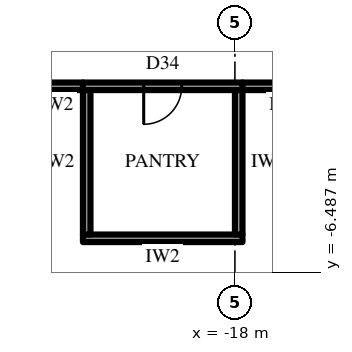
"""IFC4 building model, lengths in metres.
Left out: names, types, materials, properties, quantities, classifications, styles, units other than length and angle.
Written with IfcOpenShell. Run it as: python <this file> out.ifc"""

import sys

from ifc_helpers import new_model, si_unit, direction, frame, frame_2d, origin, place, context, subcontext, project, spatial, rectangle, extrude, element, fill, save


model = new_model("IFC4")
c1 = context("Model", 3, precision=1e-05, world=origin(), true_north=direction((0.0, 1.0)))
c2 = subcontext(c1, "Body", "Model", "MODEL_VIEW")
j1 = project(units=[si_unit("LENGTHUNIT", "METRE"), si_unit("PLANEANGLEUNIT", "RADIAN")], contexts=[c1])
p1 = place(None, origin())
s1 = spatial("IfcSite", under=j1, at=p1, CompositionType="ELEMENT")
p2 = place(p1, origin())
s2 = spatial("IfcBuilding", under=s1, at=p2, CompositionType="ELEMENT")
p3 = place(p2, frame((0.0, 0.0, 240.7)))
s3 = spatial("IfcBuildingStorey", under=s2, at=p3, CompositionType="ELEMENT", Elevation=240.7)
p4 = place(p3, frame((-31.263, -3.551, 0.0), z_axis=(0.0, 0.0, 1.0), x_axis=(0.500000442367, -0.866025148383, 0.0)))
e1 = element("IfcWall", 1, at=p4, inside=s3, PredefinedType="SOLIDWALL", context=c2, shape_type="SweptSolid", body=[
    extrude(rectangle(XDim=25.113, YDim=0.3, at=frame_2d((12.556, 0.0))), origin(), (0.0, 0.0, 1.0), 2.8),
])
p5 = place(p4, frame((4.278, 0.0, 0.6)))
e2 = element("IfcOpeningElement", 2, at=p5, cuts=e1, PredefinedType="OPENING", context=c2, shape_type="SweptSolid", body=[
    extrude(rectangle(XDim=2.7, YDim=1.95, at=frame_2d((1.35, 0.975))), frame((0.0, 0.16, 0.0), z_axis=(0.0, -1.0, 0.0), x_axis=(1.0, 0.0, 0.0)), (0.0, 0.0, 1.0), 0.32),
])
p6 = place(p4, frame((9.647, 0.0, 0.0)))
e3 = element("IfcOpeningElement", 3, at=p6, cuts=e1, PredefinedType="OPENING", context=c2, shape_type="SweptSolid", body=[
    extrude(rectangle(XDim=1.2, YDim=2.4, at=frame_2d((0.6, 1.2))), frame((0.0, 0.16, 0.0), z_axis=(0.0, -1.0, 0.0), x_axis=(1.0, 0.0, 0.0)), (0.0, 0.0, 1.0), 0.32),
])
p7 = place(p4, frame((13.516, 0.0, 0.6)))
e4 = element("IfcOpeningElement", 4, at=p7, cuts=e1, PredefinedType="OPENING", context=c2, shape_type="SweptSolid", body=[
    extrude(rectangle(XDim=2.7, YDim=1.95, at=frame_2d((1.35, 0.975))), frame((0.0, 0.16, 0.0), z_axis=(0.0, -1.0, 0.0), x_axis=(1.0, 0.0, 0.0)), (0.0, 0.0, 1.0), 0.32),
])
p8 = place(p4, frame((18.135, 0.0, 0.6)))
e5 = element("IfcOpeningElement", 5, at=p8, cuts=e1, PredefinedType="OPENING", context=c2, shape_type="SweptSolid", body=[
    extrude(rectangle(XDim=2.7, YDim=1.95, at=frame_2d((1.35, 0.975))), frame((0.0, 0.16, 0.0), z_axis=(0.0, -1.0, 0.0), x_axis=(1.0, 0.0, 0.0)), (0.0, 0.0, 1.0), 0.32),
])
p9 = place(p3, frame((-17.8, -1.6, 0.0), z_axis=(0.0, 0.0, 1.0), x_axis=(-1.0, 0.0, 0.0)))
e6 = element("IfcWall", 6, at=p9, inside=s3, PredefinedType="PARTITIONING", context=c2, shape_type="SweptSolid", body=[
    extrude(rectangle(XDim=4.2, YDim=0.2, at=frame_2d((2.1, 0.0))), origin(), (0.0, 0.0, 1.0), 4.0),
])
p10 = place(p9, frame((1.6, 0.0, 0.0)))
e7 = element("IfcOpeningElement", 7, at=p10, cuts=e6, PredefinedType="OPENING", context=c2, shape_type="SweptSolid", body=[
    extrude(rectangle(XDim=1.0, YDim=2.2, at=frame_2d((0.5, 1.1))), frame((0.0, 0.11, 0.0), z_axis=(0.0, -1.0, 0.0), x_axis=(1.0, 0.0, 0.0)), (0.0, 0.0, 1.0), 0.22),
])
p11 = place(p3, frame((-17.8, -5.6, 0.0), z_axis=(0.0, 0.0, 1.0), x_axis=(-1.0, 0.0, 0.0)))
e8 = element("IfcWall", 8, at=p11, inside=s3, PredefinedType="PARTITIONING", context=c2, shape_type="SweptSolid", body=[
    extrude(rectangle(XDim=4.2, YDim=0.2, at=frame_2d((2.1, 0.0))), origin(), (0.0, 0.0, 1.0), 4.0),
])
for number, where, z_axis, x_axis in (
    (9, (-17.9, -1.7, 0.0), (0.0, 0.0, 1.0), (0.0, -1.0, 0.0)),
    (10, (-21.9, -1.7, 0.0), (0.0, 0.0, 1.0), (0.0, -1.0, 0.0)),
):
    element("IfcWall", number, at=place(p3, frame(where, z_axis=z_axis, x_axis=x_axis)), inside=s3, PredefinedType="PARTITIONING", context=c2, shape_type="SweptSolid", body=[
        extrude(rectangle(XDim=3.8, YDim=0.2, at=frame_2d((1.9, 0.0))), origin(), (0.0, 0.0, 1.0), 4.0),
    ])
p12 = place(p3, frame((-22.0, -1.6, 0.0), z_axis=(0.0, 0.0, 1.0), x_axis=(-1.0, 0.0, 0.0)))
e11 = element("IfcWall", 11, at=p12, inside=s3, PredefinedType="PARTITIONING", context=c2, shape_type="SweptSolid", body=[
    extrude(rectangle(XDim=3.2, YDim=0.2, at=frame_2d((1.6, 0.0))), origin(), (0.0, 0.0, 1.0), 4.0),
])
p13 = place(p12, frame((1.5, 0.0, 0.0)))
e12 = element("IfcOpeningElement", 12, at=p13, cuts=e11, PredefinedType="OPENING", context=c2, shape_type="SweptSolid", body=[
    extrude(rectangle(XDim=1.0, YDim=2.2, at=frame_2d((0.5, 1.1))), frame((0.0, 0.11, 0.0), z_axis=(0.0, -1.0, 0.0), x_axis=(1.0, 0.0, 0.0)), (0.0, 0.0, 1.0), 0.22),
])
p14 = place(p3, frame((-15.5, -1.6, 0.0), z_axis=(0.0, 0.0, 1.0), x_axis=(-1.0, 0.0, 0.0)))
e13 = element("IfcWall", 13, at=p14, inside=s3, PredefinedType="PARTITIONING", context=c2, shape_type="SweptSolid", body=[
    extrude(rectangle(XDim=2.3, YDim=0.2, at=frame_2d((1.15, 0.0))), origin(), (0.0, 0.0, 1.0), 4.0),
])
p15 = place(p10, origin())
e14 = element("IfcDoor", 14, at=p15, inside=s3, OperationType="SINGLE_SWING_LEFT", PredefinedType="DOOR", context=c2, shape_type="SweptSolid", body=[
    extrude(rectangle(XDim=1.0, YDim=2.2, at=frame_2d((0.5, 1.1))), frame((0.0, 0.025, 0.0), z_axis=(0.0, -1.0, 0.0), x_axis=(1.0, 0.0, 0.0)), (0.0, 0.0, 1.0), 0.05),
])
fill(e7, e14)
save(model, sys.argv[1])
